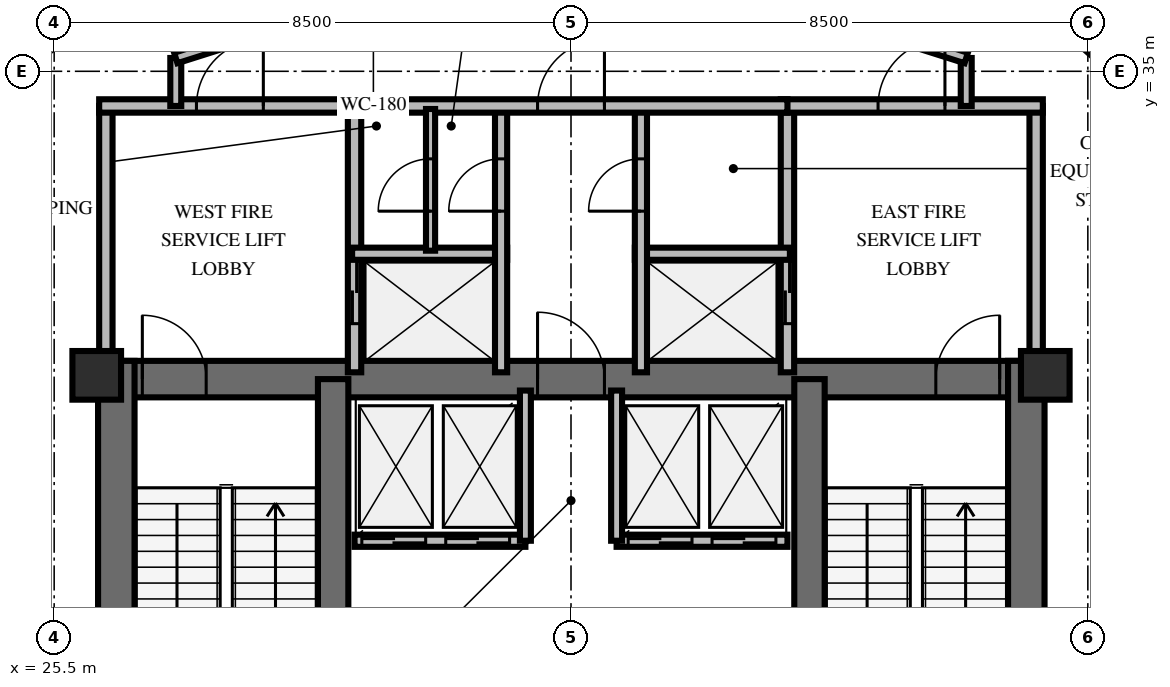
"""IFC4 building model, lengths in metres.
Left out: names, types, materials, properties, quantities, classifications, styles, units other than length and angle.
Written with IfcOpenShell. Run it as: python <this file> out.ifc"""

import sys

from ifc_helpers import new_model, si_unit, direction, frame, frame_2d, origin, origin_2d, place, context, subcontext, project, spatial, rectangle, extrude, element, fill, save


model = new_model("IFC4")
c1 = context("Model", 3, precision=1e-05, world=origin(), true_north=direction((0.0, 1.0)))
c2 = subcontext(c1, "Body", "Model", "MODEL_VIEW")
j1 = project(units=[si_unit("LENGTHUNIT", "METRE"), si_unit("PLANEANGLEUNIT", "RADIAN")], contexts=[c1])
p1 = place(None, origin())
s1 = spatial("IfcSite", under=j1, at=p1, CompositionType="ELEMENT")
p2 = place(p1, origin())
s2 = spatial("IfcBuilding", under=s1, at=p2, CompositionType="ELEMENT")
p3 = place(p2, frame((0.0, 0.0, 262.8)))
s3 = spatial("IfcBuildingStorey", under=s2, at=p3, CompositionType="ELEMENT", Elevation=262.8)
p4 = place(p3, frame((26.222, 29.938, 0.0), z_axis=(0.0, 0.0, 1.0), x_axis=(1.0, 0.0, 0.0)))
e1 = element("IfcWall", 1, at=p4, inside=s3, PredefinedType="SHEAR", context=c2, shape_type="SweptSolid", body=[
    extrude(rectangle(XDim=15.566, YDim=0.6, at=frame_2d((7.783, 0.0))), origin(), (0.0, 0.0, 1.0), 3.6),
])
p5 = place(p4, frame((0.728, 0.0, 0.0)))
e2 = element("IfcOpeningElement", 2, at=p5, cuts=e1, PredefinedType="OPENING", context=c2, shape_type="SweptSolid", body=[
    extrude(rectangle(XDim=1.05, YDim=2.15, at=frame_2d((0.525, 1.075))), frame((0.0, 0.31, 0.0), z_axis=(0.0, -1.0, 0.0), x_axis=(1.0, 0.0, 0.0)), (0.0, 0.0, 1.0), 0.62),
])
p6 = place(p4, frame((13.778, 0.0, 0.0)))
e3 = element("IfcOpeningElement", 3, at=p6, cuts=e1, PredefinedType="OPENING", context=c2, shape_type="SweptSolid", body=[
    extrude(rectangle(XDim=1.05, YDim=2.15, at=frame_2d((0.525, 1.075))), frame((0.0, 0.31, 0.0), z_axis=(0.0, -1.0, 0.0), x_axis=(1.0, 0.0, 0.0)), (0.0, 0.0, 1.0), 0.62),
])
p7 = place(p4, frame((7.228, 0.0, 0.0)))
e4 = element("IfcOpeningElement", 4, at=p7, cuts=e1, PredefinedType="OPENING", context=c2, shape_type="SweptSolid", body=[
    extrude(rectangle(XDim=1.1, YDim=2.15, at=frame_2d((0.55, 1.075))), frame((0.0, 0.31, 0.0), z_axis=(0.0, -1.0, 0.0), x_axis=(1.0, 0.0, 0.0)), (0.0, 0.0, 1.0), 0.62),
])
for number, where, z_axis, x_axis in (
    (5, (26.522, 19.962, 0.0), (0.0, 0.0, 1.0), (0.0, 1.0, 0.0)),
    (6, (41.488, 19.962, 0.0), (0.0, 0.0, 1.0), (0.0, 1.0, 0.0)),
):
    element("IfcWall", number, at=place(p3, frame(where, z_axis=z_axis, x_axis=x_axis)), inside=s3, PredefinedType="SHEAR", context=c2, shape_type="SweptSolid", body=[
        extrude(rectangle(XDim=10.276, YDim=0.6, at=frame_2d((5.138, 0.0))), origin(), (0.0, 0.0, 1.0), 3.6),
    ])
for number, where, z_axis, x_axis in (
    (7, (30.088, 20.262, 0.0), (0.0, 0.0, 1.0), (0.0, 1.0, 0.0)),
    (8, (37.922, 20.262, 0.0), (0.0, 0.0, 1.0), (0.0, 1.0, 0.0)),
):
    element("IfcWall", number, at=place(p3, frame(where, z_axis=z_axis, x_axis=x_axis)), inside=s3, PredefinedType="SHEAR", context=c2, shape_type="SweptSolid", body=[
        extrude(rectangle(XDim=9.676, YDim=0.5, at=frame_2d((4.838, 0.0))), origin(), (0.0, 0.0, 1.0), 3.6),
    ])
for number, where, z_axis, x_axis in (
    (9, (26.2, 30.0, 0.0), (0.0, 0.0, 1.0), (1.0, 0.0, 0.0)),
    (10, (41.8, 30.0, 0.0), (0.0, 0.0, 1.0), (1.0, 0.0, 0.0)),
):
    element("IfcColumn", number, at=place(p3, frame(where, z_axis=z_axis, x_axis=x_axis)), inside=s3, PredefinedType="PILASTER", context=c2, shape_type="SweptSolid", body=[
        extrude(rectangle(XDim=0.8, YDim=0.8, at=origin_2d()), origin(), (0.0, 0.0, 1.0), 3.6),
    ])
p8 = place(p3, frame((26.35, 30.05, 0.0), z_axis=(0.0, 0.0, 1.0), x_axis=(0.0, 1.0, 0.0)))
e11 = element("IfcWall", 11, at=p8, inside=s3, PredefinedType="SOLIDWALL", context=c2, shape_type="SweptSolid", body=[
    extrude(rectangle(XDim=4.38, YDim=0.22, at=frame_2d((2.19, 0.0))), origin(), (0.0, 0.0, 1.0), 2.46),
])
p9 = place(p3, frame((30.44, 30.05, 0.0), z_axis=(0.0, 0.0, 1.0), x_axis=(0.0, 1.0, 0.0)))
e12 = element("IfcWall", 12, at=p9, inside=s3, PredefinedType="SOLIDWALL", context=c2, shape_type="SweptSolid", body=[
    extrude(rectangle(XDim=4.38, YDim=0.22, at=frame_2d((2.19, 0.0))), origin(), (0.0, 0.0, 1.0), 2.46),
])
p10 = place(p9, frame((0.8, 0.0, 0.0)))
e13 = element("IfcOpeningElement", 13, at=p10, cuts=e12, PredefinedType="OPENING", context=c2, shape_type="SweptSolid", body=[
    extrude(rectangle(XDim=1.05, YDim=2.1, at=frame_2d((0.525, 1.05))), frame((0.0, 0.12, 0.0), z_axis=(0.0, -1.0, 0.0), x_axis=(1.0, 0.0, 0.0)), (0.0, 0.0, 1.0), 0.24),
])
p11 = place(p3, frame((26.24, 34.43, 0.0), z_axis=(0.0, 0.0, 1.0), x_axis=(1.0, 0.0, 0.0)))
e14 = element("IfcWall", 14, at=p11, inside=s3, PredefinedType="SOLIDWALL", context=c2, shape_type="SweptSolid", body=[
    extrude(rectangle(XDim=4.31, YDim=0.22, at=frame_2d((2.155, 0.0))), origin(), (0.0, 0.0, 1.0), 2.46),
])
p12 = place(p11, frame((1.6, 0.0, 0.0)))
e15 = element("IfcOpeningElement", 15, at=p12, cuts=e14, PredefinedType="OPENING", context=c2, shape_type="SweptSolid", body=[
    extrude(rectangle(XDim=1.1, YDim=2.15, at=frame_2d((0.55, 1.075))), frame((0.0, 0.12, 0.0), z_axis=(0.0, -1.0, 0.0), x_axis=(1.0, 0.0, 0.0)), (0.0, 0.0, 1.0), 0.24),
])
p13 = place(p3, frame((30.4, 32.0, 0.0), z_axis=(0.0, 0.0, 1.0), x_axis=(1.0, 0.0, 0.0)))
e16 = element("IfcWall", 16, at=p13, inside=s3, PredefinedType="SOLIDWALL", context=c2, shape_type="SweptSolid", body=[
    extrude(rectangle(XDim=2.55, YDim=0.2, at=frame_2d((1.275, 0.0))), origin(), (0.0, 0.0, 1.0), 2.46),
])
p14 = place(p3, frame((32.85, 30.05, 0.0), z_axis=(0.0, 0.0, 1.0), x_axis=(0.0, 1.0, 0.0)))
e17 = element("IfcWall", 17, at=p14, inside=s3, PredefinedType="SOLIDWALL", context=c2, shape_type="SweptSolid", body=[
    extrude(rectangle(XDim=4.38, YDim=0.2, at=frame_2d((2.19, 0.0))), origin(), (0.0, 0.0, 1.0), 2.46),
])
p15 = place(p14, frame((2.65, 0.0, 0.0)))
e18 = element("IfcOpeningElement", 18, at=p15, cuts=e17, PredefinedType="OPENING", context=c2, shape_type="SweptSolid", body=[
    extrude(rectangle(XDim=0.86, YDim=2.05, at=frame_2d((0.43, 1.025))), frame((0.0, 0.11, 0.0), z_axis=(0.0, -1.0, 0.0), x_axis=(1.0, 0.0, 0.0)), (0.0, 0.0, 1.0), 0.22),
])
p16 = place(p3, frame((37.56, 30.05, 0.0), z_axis=(0.0, 0.0, 1.0), x_axis=(0.0, 1.0, 0.0)))
e19 = element("IfcWall", 19, at=p16, inside=s3, PredefinedType="SOLIDWALL", context=c2, shape_type="SweptSolid", body=[
    extrude(rectangle(XDim=4.38, YDim=0.22, at=frame_2d((2.19, 0.0))), origin(), (0.0, 0.0, 1.0), 2.46),
])
p17 = place(p16, frame((0.8, 0.0, 0.0)))
e20 = element("IfcOpeningElement", 20, at=p17, cuts=e19, PredefinedType="OPENING", context=c2, shape_type="SweptSolid", body=[
    extrude(rectangle(XDim=1.05, YDim=2.1, at=frame_2d((0.525, 1.05))), frame((0.0, 0.12, 0.0), z_axis=(0.0, -1.0, 0.0), x_axis=(1.0, 0.0, 0.0)), (0.0, 0.0, 1.0), 0.24),
])
p18 = place(p3, frame((41.65, 30.05, 0.0), z_axis=(0.0, 0.0, 1.0), x_axis=(0.0, 1.0, 0.0)))
e21 = element("IfcWall", 21, at=p18, inside=s3, PredefinedType="SOLIDWALL", context=c2, shape_type="SweptSolid", body=[
    extrude(rectangle(XDim=4.38, YDim=0.22, at=frame_2d((2.19, 0.0))), origin(), (0.0, 0.0, 1.0), 2.46),
])
p19 = place(p3, frame((37.45, 34.43, 0.0), z_axis=(0.0, 0.0, 1.0), x_axis=(1.0, 0.0, 0.0)))
e22 = element("IfcWall", 22, at=p19, inside=s3, PredefinedType="SOLIDWALL", context=c2, shape_type="SweptSolid", body=[
    extrude(rectangle(XDim=4.31, YDim=0.22, at=frame_2d((2.155, 0.0))), origin(), (0.0, 0.0, 1.0), 2.46),
])
p20 = place(p19, frame((1.6, 0.0, 0.0)))
e23 = element("IfcOpeningElement", 23, at=p20, cuts=e22, PredefinedType="OPENING", context=c2, shape_type="SweptSolid", body=[
    extrude(rectangle(XDim=1.1, YDim=2.15, at=frame_2d((0.55, 1.075))), frame((0.0, 0.12, 0.0), z_axis=(0.0, -1.0, 0.0), x_axis=(1.0, 0.0, 0.0)), (0.0, 0.0, 1.0), 0.24),
])
p21 = place(p3, frame((35.05, 32.0, 0.0), z_axis=(0.0, 0.0, 1.0), x_axis=(1.0, 0.0, 0.0)))
e24 = element("IfcWall", 24, at=p21, inside=s3, PredefinedType="SOLIDWALL", context=c2, shape_type="SweptSolid", body=[
    extrude(rectangle(XDim=2.55, YDim=0.2, at=frame_2d((1.275, 0.0))), origin(), (0.0, 0.0, 1.0), 2.46),
])
p22 = place(p3, frame((35.15, 30.05, 0.0), z_axis=(0.0, 0.0, 1.0), x_axis=(0.0, 1.0, 0.0)))
e25 = element("IfcWall", 25, at=p22, inside=s3, PredefinedType="SOLIDWALL", context=c2, shape_type="SweptSolid", body=[
    extrude(rectangle(XDim=4.38, YDim=0.2, at=frame_2d((2.19, 0.0))), origin(), (0.0, 0.0, 1.0), 2.46),
])
p23 = place(p22, frame((2.65, 0.0, 0.0)))
e26 = element("IfcOpeningElement", 26, at=p23, cuts=e25, PredefinedType="OPENING", context=c2, shape_type="SweptSolid", body=[
    extrude(rectangle(XDim=0.86, YDim=2.05, at=frame_2d((0.43, 1.025))), frame((0.0, 0.11, 0.0), z_axis=(0.0, -1.0, 0.0), x_axis=(1.0, 0.0, 0.0)), (0.0, 0.0, 1.0), 0.22),
])
p24 = place(p3, frame((30.44, 34.43, 0.0), z_axis=(0.0, 0.0, 1.0), x_axis=(1.0, 0.0, 0.0)))
e27 = element("IfcWall", 27, at=p24, inside=s3, PredefinedType="SOLIDWALL", context=c2, shape_type="SweptSolid", body=[
    extrude(rectangle(XDim=7.12, YDim=0.22, at=frame_2d((3.56, 0.0))), origin(), (0.0, 0.0, 1.0), 2.46),
])
p25 = place(p24, frame((3.01, 0.0, 0.0)))
e28 = element("IfcOpeningElement", 28, at=p25, cuts=e27, PredefinedType="OPENING", context=c2, shape_type="SweptSolid", body=[
    extrude(rectangle(XDim=1.1, YDim=2.15, at=frame_2d((0.55, 1.075))), frame((0.0, 0.12, 0.0), z_axis=(0.0, -1.0, 0.0), x_axis=(1.0, 0.0, 0.0)), (0.0, 0.0, 1.0), 0.24),
])
p26 = place(p3, frame((31.69, 32.05, 0.0), z_axis=(0.0, 0.0, 1.0), x_axis=(0.0, 1.0, 0.0)))
e29 = element("IfcWall", 29, at=p26, inside=s3, PredefinedType="PARTITIONING", context=c2, shape_type="SweptSolid", body=[
    extrude(rectangle(XDim=2.33, YDim=0.15, at=frame_2d((1.165, 0.0))), origin(), (0.0, 0.0, 1.0), 2.46),
])
p27 = place(p26, frame((0.65, 0.0, 0.0)))
e30 = element("IfcOpeningElement", 30, at=p27, cuts=e29, PredefinedType="OPENING", context=c2, shape_type="SweptSolid", body=[
    extrude(rectangle(XDim=0.86, YDim=2.05, at=frame_2d((0.43, 1.025))), frame((0.0, 0.085, 0.0), z_axis=(0.0, -1.0, 0.0), x_axis=(1.0, 0.0, 0.0)), (0.0, 0.0, 1.0), 0.17),
])
p28 = place(p3, frame((30.44, 27.28, 0.0), z_axis=(0.0, 0.0, 1.0), x_axis=(1.0, 0.0, 0.0)))
e31 = element("IfcWall", 31, at=p28, inside=s3, PredefinedType="SOLIDWALL", context=c2, shape_type="SweptSolid", body=[
    extrude(rectangle(XDim=2.81, YDim=0.2, at=frame_2d((1.405, 0.0))), origin(), (0.0, 0.0, 1.0), 2.46),
])
p29 = place(p28, frame((0.12, 0.0, 0.0)))
e32 = element("IfcOpeningElement", 32, at=p29, cuts=e31, PredefinedType="OPENING", context=c2, shape_type="SweptSolid", body=[
    extrude(rectangle(XDim=1.05, YDim=2.1, at=frame_2d((0.525, 1.05))), frame((0.0, 0.11, 0.0), z_axis=(0.0, -1.0, 0.0), x_axis=(1.0, 0.0, 0.0)), (0.0, 0.0, 1.0), 0.22),
])
p30 = place(p28, frame((1.5, 0.0, 0.0)))
e33 = element("IfcOpeningElement", 33, at=p30, cuts=e31, PredefinedType="OPENING", context=c2, shape_type="SweptSolid", body=[
    extrude(rectangle(XDim=1.05, YDim=2.1, at=frame_2d((0.525, 1.05))), frame((0.0, 0.11, 0.0), z_axis=(0.0, -1.0, 0.0), x_axis=(1.0, 0.0, 0.0)), (0.0, 0.0, 1.0), 0.22),
])
p31 = place(p3, frame((33.25, 27.28, 0.0), z_axis=(0.0, 0.0, 1.0), x_axis=(0.0, 1.0, 0.0)))
e34 = element("IfcWall", 34, at=p31, inside=s3, PredefinedType="SOLIDWALL", context=c2, shape_type="SweptSolid", body=[
    extrude(rectangle(XDim=2.47, YDim=0.18, at=frame_2d((1.235, 0.0))), origin(), (0.0, 0.0, 1.0), 2.46),
])
p32 = place(p3, frame((34.75, 27.28, 0.0), z_axis=(0.0, 0.0, 1.0), x_axis=(1.0, 0.0, 0.0)))
e35 = element("IfcWall", 35, at=p32, inside=s3, PredefinedType="SOLIDWALL", context=c2, shape_type="SweptSolid", body=[
    extrude(rectangle(XDim=2.81, YDim=0.2, at=frame_2d((1.405, 0.0))), origin(), (0.0, 0.0, 1.0), 2.46),
])
p33 = place(p32, frame((0.19, 0.0, 0.0)))
e36 = element("IfcOpeningElement", 36, at=p33, cuts=e35, PredefinedType="OPENING", context=c2, shape_type="SweptSolid", body=[
    extrude(rectangle(XDim=1.05, YDim=2.1, at=frame_2d((0.525, 1.05))), frame((0.0, 0.11, 0.0), z_axis=(0.0, -1.0, 0.0), x_axis=(1.0, 0.0, 0.0)), (0.0, 0.0, 1.0), 0.22),
])
p34 = place(p32, frame((1.57, 0.0, 0.0)))
e37 = element("IfcOpeningElement", 37, at=p34, cuts=e35, PredefinedType="OPENING", context=c2, shape_type="SweptSolid", body=[
    extrude(rectangle(XDim=1.05, YDim=2.1, at=frame_2d((0.525, 1.05))), frame((0.0, 0.11, 0.0), z_axis=(0.0, -1.0, 0.0), x_axis=(1.0, 0.0, 0.0)), (0.0, 0.0, 1.0), 0.22),
])
p35 = place(p3, frame((34.75, 27.28, 0.0), z_axis=(0.0, 0.0, 1.0), x_axis=(0.0, 1.0, 0.0)))
e38 = element("IfcWall", 38, at=p35, inside=s3, PredefinedType="SOLIDWALL", context=c2, shape_type="SweptSolid", body=[
    extrude(rectangle(XDim=2.47, YDim=0.18, at=frame_2d((1.235, 0.0))), origin(), (0.0, 0.0, 1.0), 2.46),
])
for number, where, z_axis, x_axis in (
    (39, (27.5, 34.43, 0.0), (0.0, 0.0, 1.0), (0.0, 1.0, 0.0)),
    (40, (40.5, 35.219, 0.0), (0.0, 0.0, 1.0), (0.0, -1.0, 0.0)),
):
    element("IfcWall", number, at=place(p3, frame(where, z_axis=z_axis, x_axis=x_axis)), inside=s3, PredefinedType="PARTITIONING", context=c2, shape_type="SweptSolid", body=[
        extrude(rectangle(XDim=0.789, YDim=0.18, at=frame_2d((0.395, 0.0))), origin(), (0.0, 0.0, 1.0), 2.46),
    ])
p36 = place(p3, frame((27.5, 35.219, 0.0), z_axis=(0.0, 0.0, 1.0), x_axis=(0.953228121756, 0.302251795518, 0.0)))
e41 = element("IfcWall", 41, at=p36, inside=s3, PredefinedType="PARTITIONING", context=c2, shape_type="SweptSolid", body=[
    extrude(rectangle(XDim=6.819, YDim=0.18, at=frame_2d((3.409, 0.0))), origin(), (0.0, 0.0, 1.0), 2.46),
])
p37 = place(p36, frame((2.86, 0.0, 0.0)))
e42 = element("IfcOpeningElement", 42, at=p37, cuts=e41, PredefinedType="OPENING", context=c2, shape_type="SweptSolid", body=[
    extrude(rectangle(XDim=1.1, YDim=2.15, at=frame_2d((0.55, 1.075))), frame((0.0, 0.1, 0.0), z_axis=(0.0, -1.0, 0.0), x_axis=(1.0, 0.0, 0.0)), (0.0, 0.0, 1.0), 0.2),
])
p38 = place(p3, frame((34.0, 37.28, 0.0), z_axis=(0.0, 0.0, 1.0), x_axis=(0.953228121756, -0.302251795518, 0.0)))
e43 = element("IfcWall", 43, at=p38, inside=s3, PredefinedType="PARTITIONING", context=c2, shape_type="SweptSolid", body=[
    extrude(rectangle(XDim=6.819, YDim=0.18, at=frame_2d((3.409, 0.0))), origin(), (0.0, 0.0, 1.0), 2.46),
])
p39 = place(p38, frame((2.86, 0.0, 0.0)))
e44 = element("IfcOpeningElement", 44, at=p39, cuts=e43, PredefinedType="OPENING", context=c2, shape_type="SweptSolid", body=[
    extrude(rectangle(XDim=1.1, YDim=2.15, at=frame_2d((0.55, 1.075))), frame((0.0, 0.1, 0.0), z_axis=(0.0, -1.0, 0.0), x_axis=(1.0, 0.0, 0.0)), (0.0, 0.0, 1.0), 0.2),
])
p40 = place(p3, frame((43.995, 34.108, 0.0), z_axis=(0.0, 0.0, 1.0), x_axis=(-0.749539264815, 0.66195988587, 0.0)))
e45 = element("IfcWall", 45, at=p40, inside=s3, PredefinedType="PARTITIONING", context=c2, shape_type="SweptSolid", body=[
    extrude(rectangle(XDim=4.248, YDim=0.18, at=frame_2d((2.124, 0.0))), origin(), (0.0, 0.0, 1.0), 2.46),
])
p41 = place(p3, frame((28.348, 37.562, 0.0), z_axis=(0.0, 0.0, 1.0), x_axis=(-0.808504545443, -0.588489931942, 0.0)))
e46 = element("IfcWall", 46, at=p41, inside=s3, PredefinedType="PARTITIONING", context=c2, shape_type="SweptSolid", body=[
    extrude(rectangle(XDim=4.47, YDim=0.18, at=frame_2d((2.235, 0.0))), origin(), (0.0, 0.0, 1.0), 2.46),
])
p42 = place(p5, origin())
e47 = element("IfcDoor", 47, at=p42, inside=s3, OperationType="SINGLE_SWING_LEFT", PredefinedType="DOOR", context=c2, shape_type="SweptSolid", body=[
    extrude(rectangle(XDim=1.05, YDim=2.15, at=frame_2d((0.525, 1.075))), frame((0.0, 0.025, 0.0), z_axis=(0.0, -1.0, 0.0), x_axis=(1.0, 0.0, 0.0)), (0.0, 0.0, 1.0), 0.05),
])
fill(e2, e47)
p43 = place(p6, origin())
e48 = element("IfcDoor", 48, at=p43, inside=s3, OperationType="SINGLE_SWING_RIGHT", PredefinedType="DOOR", context=c2, shape_type="SweptSolid", body=[
    extrude(rectangle(XDim=1.05, YDim=2.15, at=frame_2d((0.525, 1.075))), frame((0.0, 0.025, 0.0), z_axis=(0.0, -1.0, 0.0), x_axis=(1.0, 0.0, 0.0)), (0.0, 0.0, 1.0), 0.05),
])
fill(e3, e48)
p44 = place(p7, origin())
e49 = element("IfcDoor", 49, at=p44, inside=s3, OperationType="SINGLE_SWING_LEFT", PredefinedType="DOOR", context=c2, shape_type="SweptSolid", body=[
    extrude(rectangle(XDim=1.1, YDim=2.15, at=frame_2d((0.55, 1.075))), frame((0.0, 0.025, 0.0), z_axis=(0.0, -1.0, 0.0), x_axis=(1.0, 0.0, 0.0)), (0.0, 0.0, 1.0), 0.05),
])
fill(e4, e49)
p45 = place(p12, origin())
e50 = element("IfcDoor", 50, at=p45, inside=s3, OperationType="SINGLE_SWING_RIGHT", PredefinedType="DOOR", context=c2, shape_type="SweptSolid", body=[
    extrude(rectangle(XDim=1.1, YDim=2.15, at=frame_2d((0.55, 1.075))), frame((0.0, 0.025, 0.0), z_axis=(0.0, -1.0, 0.0), x_axis=(1.0, 0.0, 0.0)), (0.0, 0.0, 1.0), 0.05),
])
fill(e15, e50)
p46 = place(p10, origin())
e51 = element("IfcDoor", 51, at=p46, inside=s3, OperationType="DOUBLE_DOOR_SLIDING", PredefinedType="USERDEFINED", context=c2, shape_type="SweptSolid", body=[
    extrude(rectangle(XDim=1.05, YDim=2.1, at=frame_2d((0.525, 1.05))), frame((0.0, 0.025, 0.0), z_axis=(0.0, -1.0, 0.0), x_axis=(1.0, 0.0, 0.0)), (0.0, 0.0, 1.0), 0.05),
])
fill(e13, e51)
p47 = place(p15, origin())
e52 = element("IfcDoor", 52, at=p47, inside=s3, OperationType="SINGLE_SWING_LEFT", PredefinedType="TRAPDOOR", context=c2, shape_type="SweptSolid", body=[
    extrude(rectangle(XDim=0.86, YDim=2.05, at=frame_2d((0.43, 1.025))), frame((0.0, 0.025, 0.0), z_axis=(0.0, -1.0, 0.0), x_axis=(1.0, 0.0, 0.0)), (0.0, 0.0, 1.0), 0.05),
])
fill(e18, e52)
p48 = place(p20, origin())
e53 = element("IfcDoor", 53, at=p48, inside=s3, OperationType="SINGLE_SWING_RIGHT", PredefinedType="DOOR", context=c2, shape_type="SweptSolid", body=[
    extrude(rectangle(XDim=1.1, YDim=2.15, at=frame_2d((0.55, 1.075))), frame((0.0, 0.025, 0.0), z_axis=(0.0, -1.0, 0.0), x_axis=(1.0, 0.0, 0.0)), (0.0, 0.0, 1.0), 0.05),
])
fill(e23, e53)
p49 = place(p17, origin())
e54 = element("IfcDoor", 54, at=p49, inside=s3, OperationType="DOUBLE_DOOR_SLIDING", PredefinedType="USERDEFINED", context=c2, shape_type="SweptSolid", body=[
    extrude(rectangle(XDim=1.05, YDim=2.1, at=frame_2d((0.525, 1.05))), frame((0.0, 0.025, 0.0), z_axis=(0.0, -1.0, 0.0), x_axis=(1.0, 0.0, 0.0)), (0.0, 0.0, 1.0), 0.05),
])
fill(e20, e54)
p50 = place(p23, origin())
e55 = element("IfcDoor", 55, at=p50, inside=s3, OperationType="SINGLE_SWING_LEFT", PredefinedType="TRAPDOOR", context=c2, shape_type="SweptSolid", body=[
    extrude(rectangle(XDim=0.86, YDim=2.05, at=frame_2d((0.43, 1.025))), frame((0.0, 0.025, 0.0), z_axis=(0.0, -1.0, 0.0), x_axis=(1.0, 0.0, 0.0)), (0.0, 0.0, 1.0), 0.05),
])
fill(e26, e55)
p51 = place(p25, origin())
e56 = element("IfcDoor", 56, at=p51, inside=s3, OperationType="SINGLE_SWING_RIGHT", PredefinedType="DOOR", context=c2, shape_type="SweptSolid", body=[
    extrude(rectangle(XDim=1.1, YDim=2.15, at=frame_2d((0.55, 1.075))), frame((0.0, 0.025, 0.0), z_axis=(0.0, -1.0, 0.0), x_axis=(1.0, 0.0, 0.0)), (0.0, 0.0, 1.0), 0.05),
])
fill(e28, e56)
p52 = place(p27, origin())
e57 = element("IfcDoor", 57, at=p52, inside=s3, OperationType="SINGLE_SWING_LEFT", PredefinedType="TRAPDOOR", context=c2, shape_type="SweptSolid", body=[
    extrude(rectangle(XDim=0.86, YDim=2.05, at=frame_2d((0.43, 1.025))), frame((0.0, 0.025, 0.0), z_axis=(0.0, -1.0, 0.0), x_axis=(1.0, 0.0, 0.0)), (0.0, 0.0, 1.0), 0.05),
])
fill(e30, e57)
p53 = place(p29, origin())
e58 = element("IfcDoor", 58, at=p53, inside=s3, OperationType="DOUBLE_DOOR_SLIDING", PredefinedType="USERDEFINED", context=c2, shape_type="SweptSolid", body=[
    extrude(rectangle(XDim=1.05, YDim=2.1, at=frame_2d((0.525, 1.05))), frame((0.0, 0.025, 0.0), z_axis=(0.0, -1.0, 0.0), x_axis=(1.0, 0.0, 0.0)), (0.0, 0.0, 1.0), 0.05),
])
fill(e32, e58)
p54 = place(p30, origin())
e59 = element("IfcDoor", 59, at=p54, inside=s3, OperationType="DOUBLE_DOOR_SLIDING", PredefinedType="USERDEFINED", context=c2, shape_type="SweptSolid", body=[
    extrude(rectangle(XDim=1.05, YDim=2.1, at=frame_2d((0.525, 1.05))), frame((0.0, 0.025, 0.0), z_axis=(0.0, -1.0, 0.0), x_axis=(1.0, 0.0, 0.0)), (0.0, 0.0, 1.0), 0.05),
])
fill(e33, e59)
p55 = place(p33, origin())
e60 = element("IfcDoor", 60, at=p55, inside=s3, OperationType="DOUBLE_DOOR_SLIDING", PredefinedType="USERDEFINED", context=c2, shape_type="SweptSolid", body=[
    extrude(rectangle(XDim=1.05, YDim=2.1, at=frame_2d((0.525, 1.05))), frame((0.0, 0.025, 0.0), z_axis=(0.0, -1.0, 0.0), x_axis=(1.0, 0.0, 0.0)), (0.0, 0.0, 1.0), 0.05),
])
fill(e36, e60)
p56 = place(p34, origin())
e61 = element("IfcDoor", 61, at=p56, inside=s3, OperationType="DOUBLE_DOOR_SLIDING", PredefinedType="USERDEFINED", context=c2, shape_type="SweptSolid", body=[
    extrude(rectangle(XDim=1.05, YDim=2.1, at=frame_2d((0.525, 1.05))), frame((0.0, 0.025, 0.0), z_axis=(0.0, -1.0, 0.0), x_axis=(1.0, 0.0, 0.0)), (0.0, 0.0, 1.0), 0.05),
])
fill(e37, e61)
save(model, sys.argv[1])
